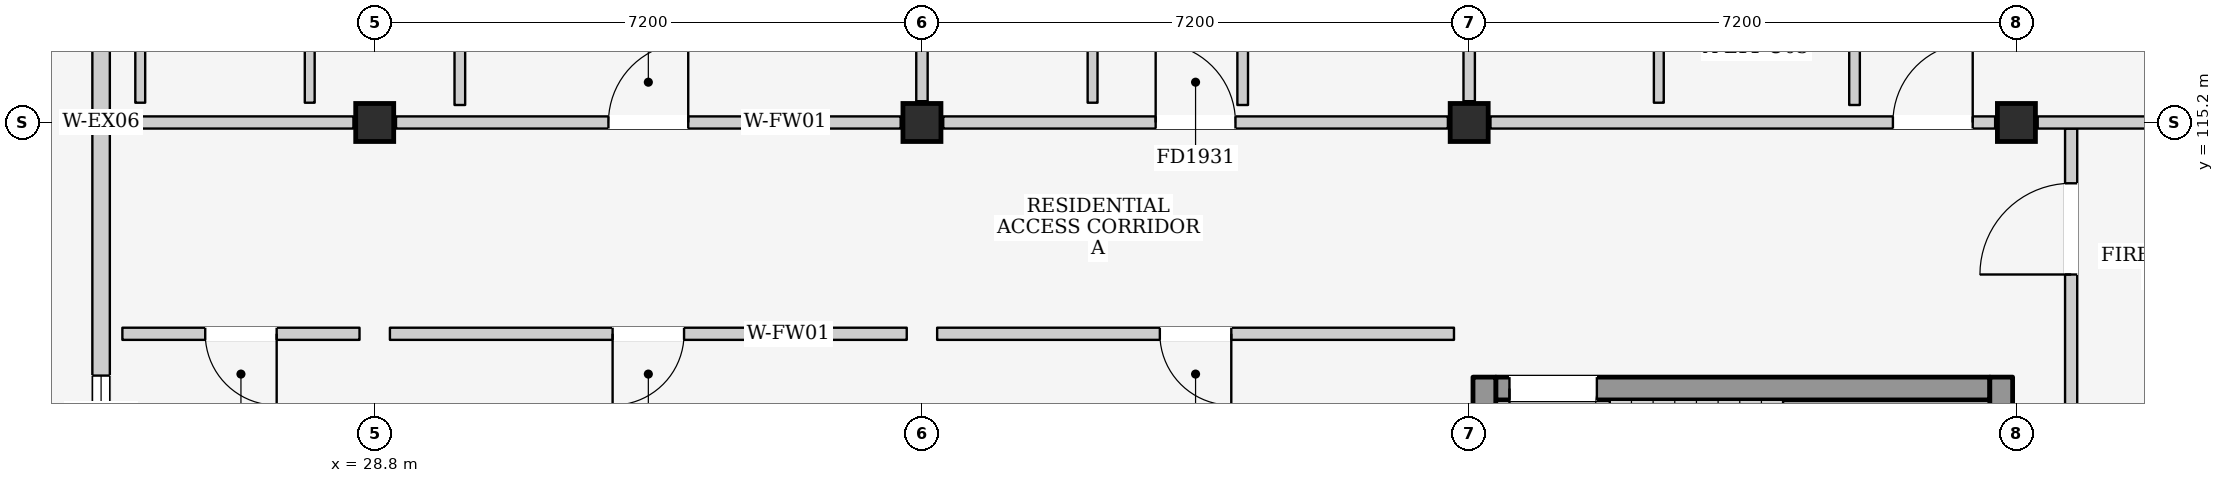
"""IFC4 building model, lengths in metres.
Left out: names, types, materials, properties, quantities, classifications, styles, units other than length and angle.
Written with IfcOpenShell. Run it as: python <this file> out.ifc"""

import sys

from ifc_helpers import new_model, si_unit, direction, frame, frame_2d, origin, origin_2d, place, context, subcontext, project, spatial, rectangle, extrude, element, fill, save


model = new_model("IFC4")
c1 = context("Model", 3, precision=1e-05, world=origin(), true_north=direction((0.0, 1.0)))
c2 = subcontext(c1, "Body", "Model", "MODEL_VIEW")
j1 = project(units=[si_unit("LENGTHUNIT", "METRE"), si_unit("PLANEANGLEUNIT", "RADIAN")], contexts=[c1])
p1 = place(None, origin())
s1 = spatial("IfcSite", under=j1, at=p1, CompositionType="ELEMENT")
p2 = place(p1, origin())
s2 = spatial("IfcBuilding", under=s1, at=p2, CompositionType="ELEMENT")
p3 = place(p2, frame((0.0, 0.0, 38.0)))
s3 = spatial("IfcBuildingStorey", under=s2, at=p3, CompositionType="ELEMENT", Elevation=38.0)
for number, where, z_axis, x_axis in (
    (1, (28.8, 115.2, 0.0), (0.0, 0.0, 1.0), (1.0, 0.0, 0.0)),
    (2, (36.0, 115.2, 0.0), (0.0, 0.0, 1.0), (1.0, 0.0, 0.0)),
    (3, (43.2, 115.2, 0.0), (0.0, 0.0, 1.0), (1.0, 0.0, 0.0)),
    (4, (50.4, 115.2, 0.0), (0.0, 0.0, 1.0), (1.0, 0.0, 0.0)),
):
    element("IfcColumn", number, at=place(p3, frame(where, z_axis=z_axis, x_axis=x_axis)), inside=s3, PredefinedType="COLUMN", context=c2, shape_type="SweptSolid", body=[
        extrude(rectangle(XDim=0.5, YDim=0.5, at=origin_2d()), origin(), (0.0, 0.0, 1.0), 3.2),
    ])
p4 = place(p3, frame((25.2, 108.12, 0.0), z_axis=(0.0, 0.0, 1.0), x_axis=(0.0, 1.0, 0.0)))
e5 = element("IfcWall", 5, at=p4, inside=s3, PredefinedType="ELEMENTEDWALL", context=c2, shape_type="SweptSolid", body=[
    extrude(rectangle(XDim=7.08, YDim=0.23, at=frame_2d((3.54, 0.0))), origin(), (0.0, 0.0, 1.0), 2.425),
])
p5 = place(p4, frame((2.75, 0.0, 1.1)))
e6 = element("IfcOpeningElement", 6, at=p5, cuts=e5, PredefinedType="OPENING", context=c2, shape_type="SweptSolid", body=[
    extrude(rectangle(XDim=1.0, YDim=0.9, at=frame_2d((0.5, 0.45))), frame((0.0, 0.13, 0.0), z_axis=(0.0, -1.0, 0.0), x_axis=(1.0, 0.0, 0.0)), (0.0, 0.0, 1.0), 0.26),
])
p6 = place(p3, frame((25.2, 115.2, 0.0), z_axis=(0.0, 0.0, 1.0), x_axis=(0.0, 1.0, 0.0)))
e7 = element("IfcWall", 7, at=p6, inside=s3, PredefinedType="ELEMENTEDWALL", context=c2, shape_type="SweptSolid", body=[
    extrude(rectangle(XDim=7.08, YDim=0.23, at=frame_2d((3.54, 0.0))), origin(), (0.0, 0.0, 1.0), 2.425),
])
p7 = place(p6, frame((3.6, 0.0, 0.0)))
e8 = element("IfcOpeningElement", 8, at=p7, cuts=e7, PredefinedType="OPENING", context=c2, shape_type="SweptSolid", body=[
    extrude(rectangle(XDim=1.08, YDim=2.12, at=frame_2d((0.54, 1.06))), frame((0.0, 0.13, 0.0), z_axis=(0.0, -1.0, 0.0), x_axis=(1.0, 0.0, 0.0)), (0.0, 0.0, 1.0), 0.26),
])
p8 = place(p3, frame((43.55, 111.7, 0.0), z_axis=(0.0, 0.0, 1.0), x_axis=(1.0, 0.0, 0.0)))
e9 = element("IfcWall", 9, at=p8, inside=s3, PredefinedType="SHEAR", context=c2, shape_type="SweptSolid", body=[
    extrude(rectangle(XDim=6.5, YDim=0.3, at=frame_2d((3.25, 0.0))), origin(), (0.0, 0.0, 1.0), 2.99),
])
p9 = place(p8, frame((0.18, 0.0, 0.0)))
e10 = element("IfcOpeningElement", 10, at=p9, cuts=e9, PredefinedType="OPENING", context=c2, shape_type="SweptSolid", body=[
    extrude(rectangle(XDim=1.15, YDim=2.2, at=frame_2d((0.575, 1.1))), frame((0.0, 0.165, 0.0), z_axis=(0.0, -1.0, 0.0), x_axis=(1.0, 0.0, 0.0)), (0.0, 0.0, 1.0), 0.33),
])
for number, where, z_axis, x_axis in (
    (11, (43.4, 108.15, 0.0), (0.0, 0.0, 1.0), (0.0, 1.0, 0.0)),
    (12, (50.2, 108.15, 0.0), (0.0, 0.0, 1.0), (0.0, 1.0, 0.0)),
):
    element("IfcWall", number, at=place(p3, frame(where, z_axis=z_axis, x_axis=x_axis)), inside=s3, PredefinedType="SHEAR", context=c2, shape_type="SweptSolid", body=[
        extrude(rectangle(XDim=3.7, YDim=0.3, at=frame_2d((1.85, 0.0))), origin(), (0.0, 0.0, 1.0), 2.99),
    ])
p10 = place(p3, frame((51.12, 111.1, 0.0), z_axis=(0.0, 0.0, 1.0), x_axis=(0.0, 1.0, 0.0)))
e13 = element("IfcWall", 13, at=p10, inside=s3, PredefinedType="PARTITIONING", context=c2, shape_type="SweptSolid", body=[
    extrude(rectangle(XDim=4.02, YDim=0.16, at=frame_2d((2.01, 0.0))), origin(), (0.0, 0.0, 1.0), 2.99),
])
p11 = place(p10, frame((2.1, 0.0, 0.0)))
e14 = element("IfcOpeningElement", 14, at=p11, cuts=e13, PredefinedType="OPENING", context=c2, shape_type="SweptSolid", body=[
    extrude(rectangle(XDim=1.2, YDim=2.2, at=frame_2d((0.6, 1.1))), frame((0.0, 0.095, 0.0), z_axis=(0.0, -1.0, 0.0), x_axis=(1.0, 0.0, 0.0)), (0.0, 0.0, 1.0), 0.19),
])
p12 = place(p3, frame((25.48, 115.2, 0.0), z_axis=(0.0, 0.0, 1.0), x_axis=(1.0, 0.0, 0.0)))
e15 = element("IfcWall", 15, at=p12, inside=s3, PredefinedType="PARTITIONING", context=c2, shape_type="SweptSolid", body=[
    extrude(rectangle(XDim=3.04, YDim=0.16, at=frame_2d((1.52, 0.0))), origin(), (0.0, 0.0, 1.0), 2.325),
])
p13 = place(p3, frame((29.08, 115.2, 0.0), z_axis=(0.0, 0.0, 1.0), x_axis=(1.0, 0.0, 0.0)))
e16 = element("IfcWall", 16, at=p13, inside=s3, PredefinedType="PARTITIONING", context=c2, shape_type="SweptSolid", body=[
    extrude(rectangle(XDim=6.64, YDim=0.16, at=frame_2d((3.32, 0.0))), origin(), (0.0, 0.0, 1.0), 2.325),
])
p14 = place(p13, frame((2.795, 0.0, 0.0)))
e17 = element("IfcOpeningElement", 17, at=p14, cuts=e16, PredefinedType="OPENING", context=c2, shape_type="SweptSolid", body=[
    extrude(rectangle(XDim=1.05, YDim=2.15, at=frame_2d((0.525, 1.075))), frame((0.0, 0.095, 0.0), z_axis=(0.0, -1.0, 0.0), x_axis=(1.0, 0.0, 0.0)), (0.0, 0.0, 1.0), 0.19),
])
p15 = place(p3, frame((36.0, 115.48, 0.0), z_axis=(0.0, 0.0, 1.0), x_axis=(0.0, 1.0, 0.0)))
e18 = element("IfcWall", 18, at=p15, inside=s3, PredefinedType="PARTITIONING", context=c2, shape_type="SweptSolid", body=[
    extrude(rectangle(XDim=6.64, YDim=0.15, at=frame_2d((3.32, 0.0))), origin(), (0.0, 0.0, 1.0), 2.475),
])
for number, where, z_axis, x_axis in (
    (19, (27.945, 115.46, 0.0), (0.0, 0.0, 1.0), (0.0, 1.0, 0.0)),
    (20, (25.715, 115.46, 0.0), (0.0, 0.0, 1.0), (0.0, 1.0, 0.0)),
):
    element("IfcWall", number, at=place(p3, frame(where, z_axis=z_axis, x_axis=x_axis)), inside=s3, PredefinedType="PARTITIONING", context=c2, shape_type="SweptSolid", body=[
        extrude(rectangle(XDim=2.13, YDim=0.13, at=frame_2d((1.065, 0.0))), origin(), (0.0, 0.0, 1.0), 2.99),
    ])
p16 = place(p3, frame((29.92, 115.43, 0.0), z_axis=(0.0, 0.0, 1.0), x_axis=(0.0, 1.0, 0.0)))
e21 = element("IfcWall", 21, at=p16, inside=s3, PredefinedType="PARTITIONING", context=c2, shape_type="SweptSolid", body=[
    extrude(rectangle(XDim=2.15, YDim=0.14, at=frame_2d((1.075, 0.0))), origin(), (0.0, 0.0, 1.0), 2.99),
])
p17 = place(p3, frame((36.28, 115.2, 0.0), z_axis=(0.0, 0.0, 1.0), x_axis=(1.0, 0.0, 0.0)))
e22 = element("IfcWall", 22, at=p17, inside=s3, PredefinedType="PARTITIONING", context=c2, shape_type="SweptSolid", body=[
    extrude(rectangle(XDim=6.64, YDim=0.16, at=frame_2d((3.32, 0.0))), origin(), (0.0, 0.0, 1.0), 2.325),
])
p18 = place(p17, frame((2.795, 0.0, 0.0)))
e23 = element("IfcOpeningElement", 23, at=p18, cuts=e22, PredefinedType="OPENING", context=c2, shape_type="SweptSolid", body=[
    extrude(rectangle(XDim=1.05, YDim=2.15, at=frame_2d((0.525, 1.075))), frame((0.0, 0.095, 0.0), z_axis=(0.0, -1.0, 0.0), x_axis=(1.0, 0.0, 0.0)), (0.0, 0.0, 1.0), 0.19),
])
p19 = place(p3, frame((43.2, 115.48, 0.0), z_axis=(0.0, 0.0, 1.0), x_axis=(0.0, 1.0, 0.0)))
e24 = element("IfcWall", 24, at=p19, inside=s3, PredefinedType="PARTITIONING", context=c2, shape_type="SweptSolid", body=[
    extrude(rectangle(XDim=6.64, YDim=0.15, at=frame_2d((3.32, 0.0))), origin(), (0.0, 0.0, 1.0), 2.475),
])
p20 = place(p3, frame((38.245, 115.46, 0.0), z_axis=(0.0, 0.0, 1.0), x_axis=(0.0, 1.0, 0.0)))
e25 = element("IfcWall", 25, at=p20, inside=s3, PredefinedType="PARTITIONING", context=c2, shape_type="SweptSolid", body=[
    extrude(rectangle(XDim=2.13, YDim=0.13, at=frame_2d((1.065, 0.0))), origin(), (0.0, 0.0, 1.0), 2.99),
])
p21 = place(p3, frame((40.22, 115.43, 0.0), z_axis=(0.0, 0.0, 1.0), x_axis=(0.0, 1.0, 0.0)))
e26 = element("IfcWall", 26, at=p21, inside=s3, PredefinedType="PARTITIONING", context=c2, shape_type="SweptSolid", body=[
    extrude(rectangle(XDim=2.15, YDim=0.14, at=frame_2d((1.075, 0.0))), origin(), (0.0, 0.0, 1.0), 2.99),
])
p22 = place(p3, frame((43.48, 115.2, 0.0), z_axis=(0.0, 0.0, 1.0), x_axis=(1.0, 0.0, 0.0)))
e27 = element("IfcWall", 27, at=p22, inside=s3, PredefinedType="PARTITIONING", context=c2, shape_type="SweptSolid", body=[
    extrude(rectangle(XDim=6.64, YDim=0.16, at=frame_2d((3.32, 0.0))), origin(), (0.0, 0.0, 1.0), 2.325),
])
p23 = place(p22, frame((5.295, 0.0, 0.0)))
e28 = element("IfcOpeningElement", 28, at=p23, cuts=e27, PredefinedType="OPENING", context=c2, shape_type="SweptSolid", body=[
    extrude(rectangle(XDim=1.05, YDim=2.15, at=frame_2d((0.525, 1.075))), frame((0.0, 0.095, 0.0), z_axis=(0.0, -1.0, 0.0), x_axis=(1.0, 0.0, 0.0)), (0.0, 0.0, 1.0), 0.19),
])
p24 = place(p3, frame((50.68, 115.2, 0.0), z_axis=(0.0, 0.0, 1.0), x_axis=(1.0, 0.0, 0.0)))
e29 = element("IfcWall", 29, at=p24, inside=s3, PredefinedType="PARTITIONING", context=c2, shape_type="SweptSolid", body=[
    extrude(rectangle(XDim=6.64, YDim=0.16, at=frame_2d((3.32, 0.0))), origin(), (0.0, 0.0, 1.0), 2.325),
])
p25 = place(p3, frame((45.695, 115.46, 0.0), z_axis=(0.0, 0.0, 1.0), x_axis=(0.0, 1.0, 0.0)))
e30 = element("IfcWall", 30, at=p25, inside=s3, PredefinedType="PARTITIONING", context=c2, shape_type="SweptSolid", body=[
    extrude(rectangle(XDim=3.04, YDim=0.13, at=frame_2d((1.52, 0.0))), origin(), (0.0, 0.0, 1.0), 2.99),
])
p26 = place(p3, frame((48.27, 115.43, 0.0), z_axis=(0.0, 0.0, 1.0), x_axis=(0.0, 1.0, 0.0)))
e31 = element("IfcWall", 31, at=p26, inside=s3, PredefinedType="PARTITIONING", context=c2, shape_type="SweptSolid", body=[
    extrude(rectangle(XDim=3.06, YDim=0.14, at=frame_2d((1.53, 0.0))), origin(), (0.0, 0.0, 1.0), 2.99),
])
p27 = place(p3, frame((25.48, 112.42, 0.0), z_axis=(0.0, 0.0, 1.0), x_axis=(1.0, 0.0, 0.0)))
e32 = element("IfcWall", 32, at=p27, inside=s3, PredefinedType="PARTITIONING", context=c2, shape_type="SweptSolid", body=[
    extrude(rectangle(XDim=3.12, YDim=0.16, at=frame_2d((1.56, 0.0))), origin(), (0.0, 0.0, 1.0), 2.99),
])
p28 = place(p27, frame((1.09, 0.0, 0.0)))
e33 = element("IfcOpeningElement", 33, at=p28, cuts=e32, PredefinedType="OPENING", context=c2, shape_type="SweptSolid", body=[
    extrude(rectangle(XDim=0.94, YDim=2.12, at=frame_2d((0.47, 1.06))), frame((0.0, 0.095, 0.0), z_axis=(0.0, -1.0, 0.0), x_axis=(1.0, 0.0, 0.0)), (0.0, 0.0, 1.0), 0.19),
])
p29 = place(p3, frame((29.0, 112.42, 0.0), z_axis=(0.0, 0.0, 1.0), x_axis=(1.0, 0.0, 0.0)))
e34 = element("IfcWall", 34, at=p29, inside=s3, PredefinedType="PARTITIONING", context=c2, shape_type="SweptSolid", body=[
    extrude(rectangle(XDim=6.8, YDim=0.16, at=frame_2d((3.4, 0.0))), origin(), (0.0, 0.0, 1.0), 2.99),
])
p30 = place(p29, frame((2.93, 0.0, 0.0)))
e35 = element("IfcOpeningElement", 35, at=p30, cuts=e34, PredefinedType="OPENING", context=c2, shape_type="SweptSolid", body=[
    extrude(rectangle(XDim=0.94, YDim=2.12, at=frame_2d((0.47, 1.06))), frame((0.0, 0.095, 0.0), z_axis=(0.0, -1.0, 0.0), x_axis=(1.0, 0.0, 0.0)), (0.0, 0.0, 1.0), 0.19),
])
p31 = place(p3, frame((36.2, 112.42, 0.0), z_axis=(0.0, 0.0, 1.0), x_axis=(1.0, 0.0, 0.0)))
e36 = element("IfcWall", 36, at=p31, inside=s3, PredefinedType="PARTITIONING", context=c2, shape_type="SweptSolid", body=[
    extrude(rectangle(XDim=6.8, YDim=0.16, at=frame_2d((3.4, 0.0))), origin(), (0.0, 0.0, 1.0), 2.99),
])
p32 = place(p31, frame((2.93, 0.0, 0.0)))
e37 = element("IfcOpeningElement", 37, at=p32, cuts=e36, PredefinedType="OPENING", context=c2, shape_type="SweptSolid", body=[
    extrude(rectangle(XDim=0.94, YDim=2.12, at=frame_2d((0.47, 1.06))), frame((0.0, 0.095, 0.0), z_axis=(0.0, -1.0, 0.0), x_axis=(1.0, 0.0, 0.0)), (0.0, 0.0, 1.0), 0.19),
])
p33 = place(p5, origin())
e38 = element("IfcWindow", 38, at=p33, inside=s3, PartitioningType="SINGLE_PANEL", PredefinedType="WINDOW", context=c2, shape_type="SweptSolid", body=[
    extrude(rectangle(XDim=1.0, YDim=0.9, at=frame_2d((0.5, 0.45))), frame((0.0, 0.03, 0.0), z_axis=(0.0, -1.0, 0.0), x_axis=(1.0, 0.0, 0.0)), (0.0, 0.0, 1.0), 0.06),
])
fill(e6, e38)
p34 = place(p9, frame((1.15, 0.0, 0.0), z_axis=(0.0, 0.0, 1.0), x_axis=(-1.0, 0.0, 0.0)))
e39 = element("IfcDoor", 39, at=p34, inside=s3, OperationType="SINGLE_SWING_RIGHT", PredefinedType="DOOR", context=c2, shape_type="SweptSolid", body=[
    extrude(rectangle(XDim=1.15, YDim=2.2, at=frame_2d((0.575, 1.1))), frame((0.0, 0.025, 0.0), z_axis=(0.0, -1.0, 0.0), x_axis=(1.0, 0.0, 0.0)), (0.0, 0.0, 1.0), 0.05),
])
fill(e10, e39)
p35 = place(p11, origin())
e40 = element("IfcDoor", 40, at=p35, inside=s3, OperationType="SINGLE_SWING_LEFT", PredefinedType="DOOR", context=c2, shape_type="SweptSolid", body=[
    extrude(rectangle(XDim=1.2, YDim=2.2, at=frame_2d((0.6, 1.1))), frame((0.0, 0.025, 0.0), z_axis=(0.0, -1.0, 0.0), x_axis=(1.0, 0.0, 0.0)), (0.0, 0.0, 1.0), 0.05),
])
fill(e14, e40)
p36 = place(p14, origin())
e41 = element("IfcDoor", 41, at=p36, inside=s3, OperationType="SINGLE_SWING_RIGHT", PredefinedType="DOOR", context=c2, shape_type="SweptSolid", body=[
    extrude(rectangle(XDim=1.05, YDim=2.15, at=frame_2d((0.525, 1.075))), frame((0.0, 0.025, 0.0), z_axis=(0.0, -1.0, 0.0), x_axis=(1.0, 0.0, 0.0)), (0.0, 0.0, 1.0), 0.05),
])
fill(e17, e41)
p37 = place(p18, origin())
e42 = element("IfcDoor", 42, at=p37, inside=s3, OperationType="SINGLE_SWING_LEFT", PredefinedType="DOOR", context=c2, shape_type="SweptSolid", body=[
    extrude(rectangle(XDim=1.05, YDim=2.15, at=frame_2d((0.525, 1.075))), frame((0.0, 0.025, 0.0), z_axis=(0.0, -1.0, 0.0), x_axis=(1.0, 0.0, 0.0)), (0.0, 0.0, 1.0), 0.05),
])
fill(e23, e42)
p38 = place(p23, origin())
e43 = element("IfcDoor", 43, at=p38, inside=s3, OperationType="SINGLE_SWING_RIGHT", PredefinedType="DOOR", context=c2, shape_type="SweptSolid", body=[
    extrude(rectangle(XDim=1.05, YDim=2.15, at=frame_2d((0.525, 1.075))), frame((0.0, 0.025, 0.0), z_axis=(0.0, -1.0, 0.0), x_axis=(1.0, 0.0, 0.0)), (0.0, 0.0, 1.0), 0.05),
])
fill(e28, e43)
p39 = place(p28, frame((0.94, 0.0, 0.0), z_axis=(0.0, 0.0, 1.0), x_axis=(-1.0, 0.0, 0.0)))
e44 = element("IfcDoor", 44, at=p39, inside=s3, OperationType="SINGLE_SWING_LEFT", PredefinedType="DOOR", context=c2, shape_type="SweptSolid", body=[
    extrude(rectangle(XDim=0.94, YDim=2.12, at=frame_2d((0.47, 1.06))), frame((0.0, 0.025, 0.0), z_axis=(0.0, -1.0, 0.0), x_axis=(1.0, 0.0, 0.0)), (0.0, 0.0, 1.0), 0.05),
])
fill(e33, e44)
p40 = place(p30, frame((0.94, 0.0, 0.0), z_axis=(0.0, 0.0, 1.0), x_axis=(-1.0, 0.0, 0.0)))
e45 = element("IfcDoor", 45, at=p40, inside=s3, OperationType="SINGLE_SWING_RIGHT", PredefinedType="DOOR", context=c2, shape_type="SweptSolid", body=[
    extrude(rectangle(XDim=0.94, YDim=2.12, at=frame_2d((0.47, 1.06))), frame((0.0, 0.025, 0.0), z_axis=(0.0, -1.0, 0.0), x_axis=(1.0, 0.0, 0.0)), (0.0, 0.0, 1.0), 0.05),
])
fill(e35, e45)
p41 = place(p32, frame((0.94, 0.0, 0.0), z_axis=(0.0, 0.0, 1.0), x_axis=(-1.0, 0.0, 0.0)))
e46 = element("IfcDoor", 46, at=p41, inside=s3, OperationType="SINGLE_SWING_LEFT", PredefinedType="DOOR", context=c2, shape_type="SweptSolid", body=[
    extrude(rectangle(XDim=0.94, YDim=2.12, at=frame_2d((0.47, 1.06))), frame((0.0, 0.025, 0.0), z_axis=(0.0, -1.0, 0.0), x_axis=(1.0, 0.0, 0.0)), (0.0, 0.0, 1.0), 0.05),
])
fill(e37, e46)
save(model, sys.argv[1])
